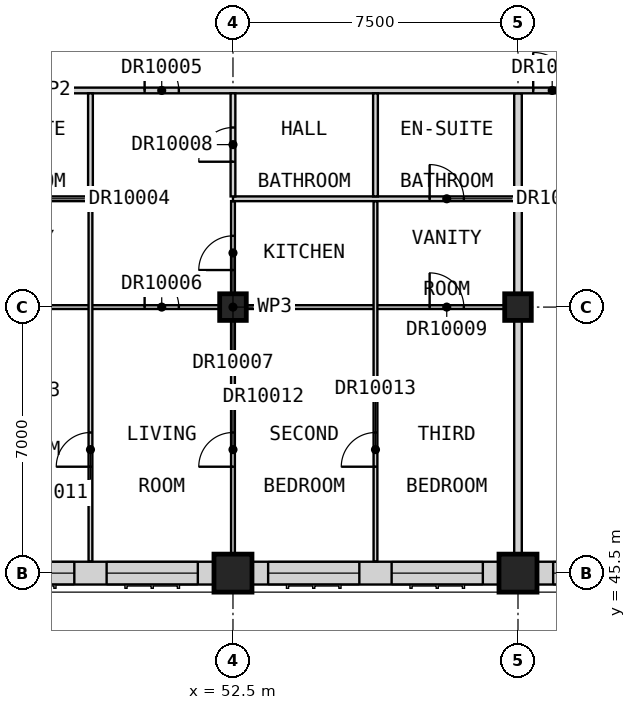
"""IFC4 building model, lengths in metres.
Left out: names, types, materials, properties, quantities, classifications, styles, units other than length and angle.
Written with IfcOpenShell. Run it as: python <this file> out.ifc"""

import sys

from ifc_helpers import new_model, si_unit, direction, frame, frame_2d, origin, origin_2d, place, context, subcontext, project, spatial, rectangle, extrude, element, fill, save


model = new_model("IFC4")
c1 = context("Model", 3, precision=1e-05, world=origin(), true_north=direction((0.0, 1.0)))
c2 = subcontext(c1, "Body", "Model", "MODEL_VIEW")
j1 = project(units=[si_unit("LENGTHUNIT", "METRE"), si_unit("PLANEANGLEUNIT", "RADIAN")], contexts=[c1])
p1 = place(None, origin())
s1 = spatial("IfcSite", under=j1, at=p1, CompositionType="ELEMENT")
p2 = place(p1, origin())
s2 = spatial("IfcBuilding", under=s1, at=p2, CompositionType="ELEMENT")
p3 = place(p2, frame((0.0, 0.0, 283.7)))
s3 = spatial("IfcBuildingStorey", under=s2, at=p3, CompositionType="ELEMENT", Elevation=283.7)
p4 = place(p3, frame((52.5, 45.5, 0.0), z_axis=(0.0, 0.0, 1.0), x_axis=(1.0, 0.0, 0.0)))
e1 = element("IfcColumn", 1, at=p4, inside=s3, PredefinedType="COLUMN", context=c2, shape_type="SweptSolid", body=[
    extrude(rectangle(XDim=1.0, YDim=1.0, at=origin_2d()), origin(), (0.0, 0.0, 1.0), 3.5),
])
p5 = place(p3, frame((52.5, 52.5, 0.0), z_axis=(0.0, 0.0, 1.0), x_axis=(1.0, 0.0, 0.0)))
e2 = element("IfcColumn", 2, at=p5, inside=s3, PredefinedType="COLUMN", context=c2, shape_type="SweptSolid", body=[
    extrude(rectangle(XDim=0.7, YDim=0.7, at=origin_2d()), origin(), (0.0, 0.0, 1.0), 3.5),
])
p6 = place(p3, frame((60.0, 45.5, 0.0), z_axis=(0.0, 0.0, 1.0), x_axis=(1.0, 0.0, 0.0)))
e3 = element("IfcColumn", 3, at=p6, inside=s3, PredefinedType="COLUMN", context=c2, shape_type="SweptSolid", body=[
    extrude(rectangle(XDim=1.0, YDim=1.0, at=origin_2d()), origin(), (0.0, 0.0, 1.0), 3.5),
])
p7 = place(p3, frame((60.0, 52.5, 0.0), z_axis=(0.0, 0.0, 1.0), x_axis=(1.0, 0.0, 0.0)))
e4 = element("IfcColumn", 4, at=p7, inside=s3, PredefinedType="COLUMN", context=c2, shape_type="SweptSolid", body=[
    extrude(rectangle(XDim=0.7, YDim=0.7, at=origin_2d()), origin(), (0.0, 0.0, 1.0), 3.5),
])
p8 = place(p3, frame((45.5, 45.5, 0.0), z_axis=(0.0, 0.0, 1.0), x_axis=(1.0, 0.0, 0.0)))
e5 = element("IfcWall", 5, at=p8, inside=s3, PredefinedType="SOLIDWALL", context=c2, shape_type="SweptSolid", body=[
    extrude(rectangle(XDim=6.5, YDim=0.6, at=frame_2d((3.25, 0.0))), origin(), (0.0, 0.0, 1.0), 2.75),
])
p9 = place(p8, frame((0.425, 0.0, 0.8)))
e6 = element("IfcOpeningElement", 6, at=p9, cuts=e5, PredefinedType="OPENING", context=c2, shape_type="SweptSolid", body=[
    extrude(rectangle(XDim=2.4, YDim=1.8, at=frame_2d((1.2, 0.9))), frame((0.0, 0.31, 0.0), z_axis=(0.0, -1.0, 0.0), x_axis=(1.0, 0.0, 0.0)), (0.0, 0.0, 1.0), 0.62),
])
p10 = place(p8, frame((3.675, 0.0, 0.8)))
e7 = element("IfcOpeningElement", 7, at=p10, cuts=e5, PredefinedType="OPENING", context=c2, shape_type="SweptSolid", body=[
    extrude(rectangle(XDim=2.4, YDim=1.8, at=frame_2d((1.2, 0.9))), frame((0.0, 0.31, 0.0), z_axis=(0.0, -1.0, 0.0), x_axis=(1.0, 0.0, 0.0)), (0.0, 0.0, 1.0), 0.62),
])
p11 = place(p3, frame((53.0, 45.5, 0.0), z_axis=(0.0, 0.0, 1.0), x_axis=(1.0, 0.0, 0.0)))
e8 = element("IfcWall", 8, at=p11, inside=s3, PredefinedType="SOLIDWALL", context=c2, shape_type="SweptSolid", body=[
    extrude(rectangle(XDim=6.5, YDim=0.6, at=frame_2d((3.25, 0.0))), origin(), (0.0, 0.0, 1.0), 2.75),
])
p12 = place(p11, frame((0.425, 0.0, 0.8)))
e9 = element("IfcOpeningElement", 9, at=p12, cuts=e8, PredefinedType="OPENING", context=c2, shape_type="SweptSolid", body=[
    extrude(rectangle(XDim=2.4, YDim=1.8, at=frame_2d((1.2, 0.9))), frame((0.0, 0.31, 0.0), z_axis=(0.0, -1.0, 0.0), x_axis=(1.0, 0.0, 0.0)), (0.0, 0.0, 1.0), 0.62),
])
p13 = place(p11, frame((3.675, 0.0, 0.8)))
e10 = element("IfcOpeningElement", 10, at=p13, cuts=e8, PredefinedType="OPENING", context=c2, shape_type="SweptSolid", body=[
    extrude(rectangle(XDim=2.4, YDim=1.8, at=frame_2d((1.2, 0.9))), frame((0.0, 0.31, 0.0), z_axis=(0.0, -1.0, 0.0), x_axis=(1.0, 0.0, 0.0)), (0.0, 0.0, 1.0), 0.62),
])
p14 = place(p3, frame((60.5, 45.5, 0.0), z_axis=(0.0, 0.0, 1.0), x_axis=(1.0, 0.0, 0.0)))
e11 = element("IfcWall", 11, at=p14, inside=s3, PredefinedType="SOLIDWALL", context=c2, shape_type="SweptSolid", body=[
    extrude(rectangle(XDim=6.5, YDim=0.6, at=frame_2d((3.25, 0.0))), origin(), (0.0, 0.0, 1.0), 2.75),
])
p15 = place(p14, frame((0.425, 0.0, 0.8)))
e12 = element("IfcOpeningElement", 12, at=p15, cuts=e11, PredefinedType="OPENING", context=c2, shape_type="SweptSolid", body=[
    extrude(rectangle(XDim=2.4, YDim=1.8, at=frame_2d((1.2, 0.9))), frame((0.0, 0.31, 0.0), z_axis=(0.0, -1.0, 0.0), x_axis=(1.0, 0.0, 0.0)), (0.0, 0.0, 1.0), 0.62),
])
p16 = place(p14, frame((3.675, 0.0, 0.8)))
e13 = element("IfcOpeningElement", 13, at=p16, cuts=e11, PredefinedType="OPENING", context=c2, shape_type="SweptSolid", body=[
    extrude(rectangle(XDim=2.4, YDim=1.8, at=frame_2d((1.2, 0.9))), frame((0.0, 0.31, 0.0), z_axis=(0.0, -1.0, 0.0), x_axis=(1.0, 0.0, 0.0)), (0.0, 0.0, 1.0), 0.62),
])
p17 = place(p3, frame((60.0, 45.0, 0.0), z_axis=(0.0, 0.0, 1.0), x_axis=(0.0, 1.0, 0.0)))
e14 = element("IfcWall", 14, at=p17, inside=s3, PredefinedType="PARTITIONING", context=c2, shape_type="SweptSolid", body=[
    extrude(rectangle(XDim=13.125, YDim=0.2, at=frame_2d((6.562, 0.0))), origin(), (0.0, 0.0, 1.0), 3.2),
])
p18 = place(p3, frame((33.75, 58.2, 0.0), z_axis=(0.0, 0.0, 1.0), x_axis=(1.0, 0.0, 0.0)))
e15 = element("IfcWall", 15, at=p18, inside=s3, PredefinedType="PARTITIONING", context=c2, shape_type="SweptSolid", body=[
    extrude(rectangle(XDim=28.05, YDim=0.15, at=frame_2d((14.025, 0.0))), origin(), (0.0, 0.0, 1.0), 3.2),
])
p19 = place(p18, frame((5.125, 0.0, 0.0)))
e16 = element("IfcOpeningElement", 16, at=p19, cuts=e15, PredefinedType="OPENING", context=c2, shape_type="SweptSolid", body=[
    extrude(rectangle(XDim=1.0, YDim=2.1, at=frame_2d((0.5, 1.05))), frame((0.0, 0.085, 0.0), z_axis=(0.0, -1.0, 0.0), x_axis=(1.0, 0.0, 0.0)), (0.0, 0.0, 1.0), 0.17),
])
p20 = place(p18, frame((16.425, 0.0, 0.0)))
e17 = element("IfcOpeningElement", 17, at=p20, cuts=e15, PredefinedType="OPENING", context=c2, shape_type="SweptSolid", body=[
    extrude(rectangle(XDim=0.9, YDim=2.1, at=frame_2d((0.45, 1.05))), frame((0.0, 0.085, 0.0), z_axis=(0.0, -1.0, 0.0), x_axis=(1.0, 0.0, 0.0)), (0.0, 0.0, 1.0), 0.17),
])
p21 = place(p18, frame((26.65, 0.0, 0.0)))
e18 = element("IfcOpeningElement", 18, at=p21, cuts=e15, PredefinedType="OPENING", context=c2, shape_type="SweptSolid", body=[
    extrude(rectangle(XDim=1.0, YDim=2.1, at=frame_2d((0.5, 1.05))), frame((0.0, 0.085, 0.0), z_axis=(0.0, -1.0, 0.0), x_axis=(1.0, 0.0, 0.0)), (0.0, 0.0, 1.0), 0.17),
])
p22 = place(p3, frame((45.1, 52.5, 0.0), z_axis=(0.0, 0.0, 1.0), x_axis=(1.0, 0.0, 0.0)))
e19 = element("IfcWall", 19, at=p22, inside=s3, PredefinedType="PARTITIONING", context=c2, shape_type="SweptSolid", body=[
    extrude(rectangle(XDim=14.8, YDim=0.1, at=frame_2d((7.4, 0.0))), origin(), (0.0, 0.0, 1.0), 3.2),
])
p23 = place(p22, frame((1.325, 0.0, 0.0)))
e20 = element("IfcOpeningElement", 20, at=p23, cuts=e19, PredefinedType="OPENING", context=c2, shape_type="SweptSolid", body=[
    extrude(rectangle(XDim=0.9, YDim=2.1, at=frame_2d((0.45, 1.05))), frame((0.0, 0.06, 0.0), z_axis=(0.0, -1.0, 0.0), x_axis=(1.0, 0.0, 0.0)), (0.0, 0.0, 1.0), 0.12),
])
p24 = place(p22, frame((5.075, 0.0, 0.0)))
e21 = element("IfcOpeningElement", 21, at=p24, cuts=e19, PredefinedType="OPENING", context=c2, shape_type="SweptSolid", body=[
    extrude(rectangle(XDim=0.9, YDim=2.1, at=frame_2d((0.45, 1.05))), frame((0.0, 0.06, 0.0), z_axis=(0.0, -1.0, 0.0), x_axis=(1.0, 0.0, 0.0)), (0.0, 0.0, 1.0), 0.12),
])
p25 = place(p22, frame((12.575, 0.0, 0.0)))
e22 = element("IfcOpeningElement", 22, at=p25, cuts=e19, PredefinedType="OPENING", context=c2, shape_type="SweptSolid", body=[
    extrude(rectangle(XDim=0.9, YDim=2.1, at=frame_2d((0.45, 1.05))), frame((0.0, 0.06, 0.0), z_axis=(0.0, -1.0, 0.0), x_axis=(1.0, 0.0, 0.0)), (0.0, 0.0, 1.0), 0.12),
])
p26 = place(p3, frame((48.75, 45.81, 0.0), z_axis=(0.0, 0.0, 1.0), x_axis=(0.0, 1.0, 0.0)))
e23 = element("IfcWall", 23, at=p26, inside=s3, PredefinedType="PARTITIONING", context=c2, shape_type="SweptSolid", body=[
    extrude(rectangle(XDim=9.478, YDim=0.1, at=frame_2d((4.739, 0.0))), origin(), (0.0, 0.0, 1.0), 3.2),
])
p27 = place(p26, frame((2.49, 0.0, 0.0)))
e24 = element("IfcOpeningElement", 24, at=p27, cuts=e23, PredefinedType="OPENING", context=c2, shape_type="SweptSolid", body=[
    extrude(rectangle(XDim=0.9, YDim=2.1, at=frame_2d((0.45, 1.05))), frame((0.0, 0.06, 0.0), z_axis=(0.0, -1.0, 0.0), x_axis=(1.0, 0.0, 0.0)), (0.0, 0.0, 1.0), 0.12),
])
p28 = place(p3, frame((52.5, 45.0, 0.0), z_axis=(0.0, 0.0, 1.0), x_axis=(0.0, 1.0, 0.0)))
e25 = element("IfcWall", 25, at=p28, inside=s3, PredefinedType="PARTITIONING", context=c2, shape_type="SweptSolid", body=[
    extrude(rectangle(XDim=10.288, YDim=0.1, at=frame_2d((5.144, 0.0))), origin(), (0.0, 0.0, 1.0), 3.2),
])
p29 = place(p28, frame((8.475, 0.0, 0.0)))
e26 = element("IfcOpeningElement", 26, at=p29, cuts=e25, PredefinedType="OPENING", context=c2, shape_type="SweptSolid", body=[
    extrude(rectangle(XDim=0.9, YDim=2.1, at=frame_2d((0.45, 1.05))), frame((0.0, 0.06, 0.0), z_axis=(0.0, -1.0, 0.0), x_axis=(1.0, 0.0, 0.0)), (0.0, 0.0, 1.0), 0.12),
])
p30 = place(p28, frame((3.3, 0.0, 0.0)))
e27 = element("IfcOpeningElement", 27, at=p30, cuts=e25, PredefinedType="OPENING", context=c2, shape_type="SweptSolid", body=[
    extrude(rectangle(XDim=0.9, YDim=2.1, at=frame_2d((0.45, 1.05))), frame((0.0, 0.06, 0.0), z_axis=(0.0, -1.0, 0.0), x_axis=(1.0, 0.0, 0.0)), (0.0, 0.0, 1.0), 0.12),
])
p31 = place(p3, frame((56.25, 45.81, 0.0), z_axis=(0.0, 0.0, 1.0), x_axis=(0.0, 1.0, 0.0)))
e28 = element("IfcWall", 28, at=p31, inside=s3, PredefinedType="PARTITIONING", context=c2, shape_type="SweptSolid", body=[
    extrude(rectangle(XDim=9.478, YDim=0.1, at=frame_2d((4.739, 0.0))), origin(), (0.0, 0.0, 1.0), 3.2),
])
p32 = place(p31, frame((2.49, 0.0, 0.0)))
e29 = element("IfcOpeningElement", 29, at=p32, cuts=e28, PredefinedType="OPENING", context=c2, shape_type="SweptSolid", body=[
    extrude(rectangle(XDim=0.9, YDim=2.1, at=frame_2d((0.45, 1.05))), frame((0.0, 0.06, 0.0), z_axis=(0.0, -1.0, 0.0), x_axis=(1.0, 0.0, 0.0)), (0.0, 0.0, 1.0), 0.12),
])
p33 = place(p3, frame((45.1, 55.35, 0.0), z_axis=(0.0, 0.0, 1.0), x_axis=(1.0, 0.0, 0.0)))
e30 = element("IfcWall", 30, at=p33, inside=s3, PredefinedType="PARTITIONING", context=c2, shape_type="SweptSolid", body=[
    extrude(rectangle(XDim=3.65, YDim=0.125, at=frame_2d((1.825, 0.0))), origin(), (0.0, 0.0, 1.0), 3.2),
])
p34 = place(p33, frame((1.325, 0.0, 0.0)))
e31 = element("IfcOpeningElement", 31, at=p34, cuts=e30, PredefinedType="OPENING", context=c2, shape_type="SweptSolid", body=[
    extrude(rectangle(XDim=0.9, YDim=2.1, at=frame_2d((0.45, 1.05))), frame((0.0, 0.073, 0.0), z_axis=(0.0, -1.0, 0.0), x_axis=(1.0, 0.0, 0.0)), (0.0, 0.0, 1.0), 0.145),
])
p35 = place(p3, frame((52.5, 55.35, 0.0), z_axis=(0.0, 0.0, 1.0), x_axis=(1.0, 0.0, 0.0)))
e32 = element("IfcWall", 32, at=p35, inside=s3, PredefinedType="PARTITIONING", context=c2, shape_type="SweptSolid", body=[
    extrude(rectangle(XDim=7.4, YDim=0.125, at=frame_2d((3.7, 0.0))), origin(), (0.0, 0.0, 1.0), 3.2),
])
p36 = place(p35, frame((5.175, 0.0, 0.0)))
e33 = element("IfcOpeningElement", 33, at=p36, cuts=e32, PredefinedType="OPENING", context=c2, shape_type="SweptSolid", body=[
    extrude(rectangle(XDim=0.9, YDim=2.1, at=frame_2d((0.45, 1.05))), frame((0.0, 0.073, 0.0), z_axis=(0.0, -1.0, 0.0), x_axis=(1.0, 0.0, 0.0)), (0.0, 0.0, 1.0), 0.145),
])
p37 = place(p3, frame((48.75, 55.413, 0.0), z_axis=(0.0, 0.0, 1.0), x_axis=(0.0, 1.0, 0.0)))
e34 = element("IfcWall", 34, at=p37, inside=s3, PredefinedType="PARTITIONING", context=c2, shape_type="SweptSolid", body=[
    extrude(rectangle(XDim=2.712, YDim=0.125, at=frame_2d((1.356, 0.0))), origin(), (0.0, 0.0, 1.0), 3.2),
])
p38 = place(p3, frame((52.5, 55.413, 0.0), z_axis=(0.0, 0.0, 1.0), x_axis=(0.0, 1.0, 0.0)))
e35 = element("IfcWall", 35, at=p38, inside=s3, PredefinedType="PARTITIONING", context=c2, shape_type="SweptSolid", body=[
    extrude(rectangle(XDim=2.712, YDim=0.125, at=frame_2d((1.356, 0.0))), origin(), (0.0, 0.0, 1.0), 3.2),
])
p39 = place(p38, frame((0.913, 0.0, 0.0)))
e36 = element("IfcOpeningElement", 36, at=p39, cuts=e35, PredefinedType="OPENING", context=c2, shape_type="SweptSolid", body=[
    extrude(rectangle(XDim=0.9, YDim=2.1, at=frame_2d((0.45, 1.05))), frame((0.0, 0.073, 0.0), z_axis=(0.0, -1.0, 0.0), x_axis=(1.0, 0.0, 0.0)), (0.0, 0.0, 1.0), 0.145),
])
p40 = place(p3, frame((56.25, 55.413, 0.0), z_axis=(0.0, 0.0, 1.0), x_axis=(0.0, 1.0, 0.0)))
e37 = element("IfcWall", 37, at=p40, inside=s3, PredefinedType="PARTITIONING", context=c2, shape_type="SweptSolid", body=[
    extrude(rectangle(XDim=2.712, YDim=0.125, at=frame_2d((1.356, 0.0))), origin(), (0.0, 0.0, 1.0), 3.2),
])
p41 = place(p9, origin())
e38 = element("IfcWindow", 38, at=p41, inside=s3, PartitioningType="SINGLE_PANEL", PredefinedType="WINDOW", context=c2, shape_type="SweptSolid", body=[
    extrude(rectangle(XDim=2.4, YDim=1.8, at=frame_2d((1.2, 0.9))), frame((0.0, -0.07, 0.0), z_axis=(0.0, -1.0, 0.0), x_axis=(1.0, 0.0, 0.0)), (0.0, 0.0, 1.0), 0.06),
])
fill(e6, e38)
p42 = place(p10, origin())
e39 = element("IfcWindow", 39, at=p42, inside=s3, PartitioningType="SINGLE_PANEL", PredefinedType="WINDOW", context=c2, shape_type="SweptSolid", body=[
    extrude(rectangle(XDim=2.4, YDim=1.8, at=frame_2d((1.2, 0.9))), frame((0.0, -0.07, 0.0), z_axis=(0.0, -1.0, 0.0), x_axis=(1.0, 0.0, 0.0)), (0.0, 0.0, 1.0), 0.06),
])
fill(e7, e39)
p43 = place(p12, origin())
e40 = element("IfcWindow", 40, at=p43, inside=s3, PartitioningType="SINGLE_PANEL", PredefinedType="WINDOW", context=c2, shape_type="SweptSolid", body=[
    extrude(rectangle(XDim=2.4, YDim=1.8, at=frame_2d((1.2, 0.9))), frame((0.0, -0.07, 0.0), z_axis=(0.0, -1.0, 0.0), x_axis=(1.0, 0.0, 0.0)), (0.0, 0.0, 1.0), 0.06),
])
fill(e9, e40)
p44 = place(p13, origin())
e41 = element("IfcWindow", 41, at=p44, inside=s3, PartitioningType="SINGLE_PANEL", PredefinedType="WINDOW", context=c2, shape_type="SweptSolid", body=[
    extrude(rectangle(XDim=2.4, YDim=1.8, at=frame_2d((1.2, 0.9))), frame((0.0, -0.07, 0.0), z_axis=(0.0, -1.0, 0.0), x_axis=(1.0, 0.0, 0.0)), (0.0, 0.0, 1.0), 0.06),
])
fill(e10, e41)
p45 = place(p15, origin())
e42 = element("IfcWindow", 42, at=p45, inside=s3, PartitioningType="SINGLE_PANEL", PredefinedType="WINDOW", context=c2, shape_type="SweptSolid", body=[
    extrude(rectangle(XDim=2.4, YDim=1.8, at=frame_2d((1.2, 0.9))), frame((0.0, -0.07, 0.0), z_axis=(0.0, -1.0, 0.0), x_axis=(1.0, 0.0, 0.0)), (0.0, 0.0, 1.0), 0.06),
])
fill(e12, e42)
p46 = place(p20, origin())
e43 = element("IfcDoor", 43, at=p46, inside=s3, OperationType="SINGLE_SWING_RIGHT", PredefinedType="DOOR", context=c2, shape_type="SweptSolid", body=[
    extrude(rectangle(XDim=0.9, YDim=2.1, at=frame_2d((0.45, 1.05))), frame((0.0, 0.025, 0.0), z_axis=(0.0, -1.0, 0.0), x_axis=(1.0, 0.0, 0.0)), (0.0, 0.0, 1.0), 0.05),
])
fill(e17, e43)
p47 = place(p24, origin())
e44 = element("IfcDoor", 44, at=p47, inside=s3, OperationType="SINGLE_SWING_LEFT", PredefinedType="DOOR", context=c2, shape_type="SweptSolid", body=[
    extrude(rectangle(XDim=0.9, YDim=2.1, at=frame_2d((0.45, 1.05))), frame((0.0, 0.025, 0.0), z_axis=(0.0, -1.0, 0.0), x_axis=(1.0, 0.0, 0.0)), (0.0, 0.0, 1.0), 0.05),
])
fill(e21, e44)
p48 = place(p29, origin())
e45 = element("IfcDoor", 45, at=p48, inside=s3, OperationType="SINGLE_SWING_RIGHT", PredefinedType="DOOR", context=c2, shape_type="SweptSolid", body=[
    extrude(rectangle(XDim=0.9, YDim=2.1, at=frame_2d((0.45, 1.05))), frame((0.0, 0.025, 0.0), z_axis=(0.0, -1.0, 0.0), x_axis=(1.0, 0.0, 0.0)), (0.0, 0.0, 1.0), 0.05),
])
fill(e26, e45)
p49 = place(p39, origin())
e46 = element("IfcDoor", 46, at=p49, inside=s3, OperationType="SINGLE_SWING_RIGHT", PredefinedType="DOOR", context=c2, shape_type="SweptSolid", body=[
    extrude(rectangle(XDim=0.9, YDim=2.1, at=frame_2d((0.45, 1.05))), frame((0.0, 0.025, 0.0), z_axis=(0.0, -1.0, 0.0), x_axis=(1.0, 0.0, 0.0)), (0.0, 0.0, 1.0), 0.05),
])
fill(e36, e46)
p50 = place(p25, origin())
e47 = element("IfcDoor", 47, at=p50, inside=s3, OperationType="SINGLE_SWING_LEFT", PredefinedType="DOOR", context=c2, shape_type="SweptSolid", body=[
    extrude(rectangle(XDim=0.9, YDim=2.1, at=frame_2d((0.45, 1.05))), frame((0.0, 0.025, 0.0), z_axis=(0.0, -1.0, 0.0), x_axis=(1.0, 0.0, 0.0)), (0.0, 0.0, 1.0), 0.05),
])
fill(e22, e47)
p51 = place(p36, origin())
e48 = element("IfcDoor", 48, at=p51, inside=s3, OperationType="SINGLE_SWING_LEFT", PredefinedType="DOOR", context=c2, shape_type="SweptSolid", body=[
    extrude(rectangle(XDim=0.9, YDim=2.1, at=frame_2d((0.45, 1.05))), frame((0.0, 0.025, 0.0), z_axis=(0.0, -1.0, 0.0), x_axis=(1.0, 0.0, 0.0)), (0.0, 0.0, 1.0), 0.05),
])
fill(e33, e48)
p52 = place(p27, origin())
e49 = element("IfcDoor", 49, at=p52, inside=s3, OperationType="SINGLE_SWING_LEFT", PredefinedType="DOOR", context=c2, shape_type="SweptSolid", body=[
    extrude(rectangle(XDim=0.9, YDim=2.1, at=frame_2d((0.45, 1.05))), frame((0.0, 0.025, 0.0), z_axis=(0.0, -1.0, 0.0), x_axis=(1.0, 0.0, 0.0)), (0.0, 0.0, 1.0), 0.05),
])
fill(e24, e49)
p53 = place(p30, origin())
e50 = element("IfcDoor", 50, at=p53, inside=s3, OperationType="SINGLE_SWING_LEFT", PredefinedType="DOOR", context=c2, shape_type="SweptSolid", body=[
    extrude(rectangle(XDim=0.9, YDim=2.1, at=frame_2d((0.45, 1.05))), frame((0.0, 0.025, 0.0), z_axis=(0.0, -1.0, 0.0), x_axis=(1.0, 0.0, 0.0)), (0.0, 0.0, 1.0), 0.05),
])
fill(e27, e50)
p54 = place(p32, origin())
e51 = element("IfcDoor", 51, at=p54, inside=s3, OperationType="SINGLE_SWING_LEFT", PredefinedType="DOOR", context=c2, shape_type="SweptSolid", body=[
    extrude(rectangle(XDim=0.9, YDim=2.1, at=frame_2d((0.45, 1.05))), frame((0.0, 0.025, 0.0), z_axis=(0.0, -1.0, 0.0), x_axis=(1.0, 0.0, 0.0)), (0.0, 0.0, 1.0), 0.05),
])
fill(e29, e51)
p55 = place(p21, origin())
e52 = element("IfcDoor", 52, at=p55, inside=s3, OperationType="SINGLE_SWING_RIGHT", PredefinedType="DOOR", context=c2, shape_type="SweptSolid", body=[
    extrude(rectangle(XDim=1.0, YDim=2.1, at=frame_2d((0.5, 1.05))), frame((0.0, 0.025, 0.0), z_axis=(0.0, -1.0, 0.0), x_axis=(1.0, 0.0, 0.0)), (0.0, 0.0, 1.0), 0.05),
])
fill(e18, e52)
save(model, sys.argv[1])
